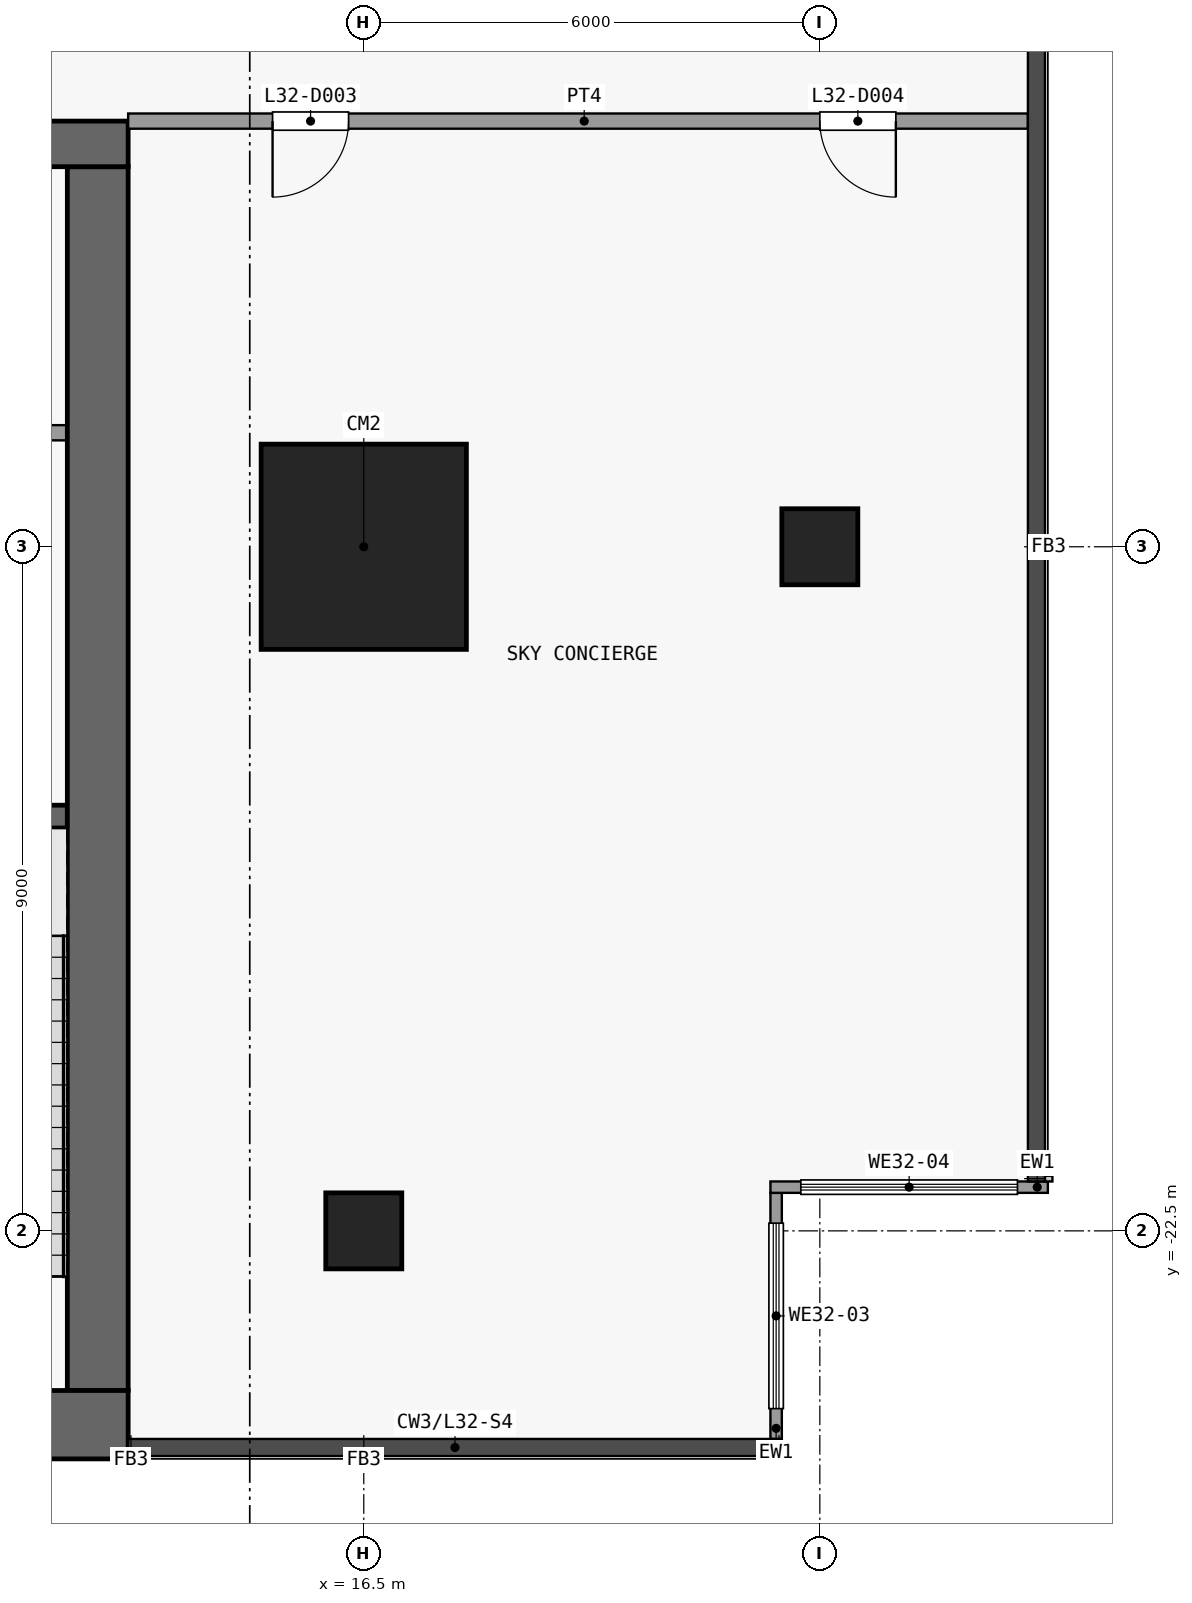
"""IFC4 building model, lengths in metres.
Left out: names, types, materials, properties, quantities, classifications, styles, units other than length and angle.
Written with IfcOpenShell. Run it as: python <this file> out.ifc"""

import sys

from ifc_helpers import new_model, si_unit, direction, frame, frame_2d, origin, origin_2d, place, context, subcontext, project, spatial, rectangle, extrude, element, fill, save


model = new_model("IFC4")
c1 = context("Model", 3, precision=1e-05, world=origin(), true_north=direction((0.0, 1.0)))
c2 = subcontext(c1, "Body", "Model", "MODEL_VIEW")
j1 = project(units=[si_unit("LENGTHUNIT", "METRE"), si_unit("PLANEANGLEUNIT", "RADIAN")], contexts=[c1])
p1 = place(None, origin())
s1 = spatial("IfcSite", under=j1, at=p1, CompositionType="ELEMENT")
p2 = place(p1, origin())
s2 = spatial("IfcBuilding", under=s1, at=p2, CompositionType="ELEMENT")
p3 = place(p2, frame((0.0, 0.0, 127.9)))
s3 = spatial("IfcBuildingStorey", under=s2, at=p3, CompositionType="ELEMENT", Elevation=127.9)
p4 = place(p3, frame((16.5, -22.5, 0.0), z_axis=(0.0, 0.0, 1.0), x_axis=(1.0, 0.0, 0.0)))
e1 = element("IfcColumn", 1, at=p4, inside=s3, PredefinedType="COLUMN", context=c2, shape_type="SweptSolid", body=[
    extrude(rectangle(XDim=1.0, YDim=1.0, at=origin_2d()), origin(), (0.0, 0.0, 1.0), 6.0),
])
p5 = place(p3, frame((16.5, -13.5, 0.0), z_axis=(0.0, 0.0, 1.0), x_axis=(1.0, 0.0, 0.0)))
e2 = element("IfcColumn", 2, at=p5, inside=s3, PredefinedType="COLUMN", context=c2, shape_type="SweptSolid", body=[
    extrude(rectangle(XDim=2.7, YDim=2.7, at=origin_2d()), origin(), (0.0, 0.0, 1.0), 6.0),
])
p6 = place(p3, frame((22.5, -13.5, 0.0), z_axis=(0.0, 0.0, 1.0), x_axis=(1.0, 0.0, 0.0)))
e3 = element("IfcColumn", 3, at=p6, inside=s3, PredefinedType="COLUMN", context=c2, shape_type="SweptSolid", body=[
    extrude(rectangle(XDim=1.0, YDim=1.0, at=origin_2d()), origin(), (0.0, 0.0, 1.0), 6.0),
])
p7 = place(p3, frame((-13.4, -25.05, 0.0), z_axis=(0.0, 0.0, 1.0), x_axis=(1.0, 0.0, 0.0)))
e4 = element("IfcWall", 4, at=p7, inside=s3, PredefinedType="SHEAR", context=c2, shape_type="SweptSolid", body=[
    extrude(rectangle(XDim=26.8, YDim=0.9, at=frame_2d((13.4, 0.0))), origin(), (0.0, 0.0, 1.0), 5.7),
])
p8 = place(p3, frame((-13.4, -8.2, 0.0), z_axis=(0.0, 0.0, 1.0), x_axis=(1.0, 0.0, 0.0)))
e5 = element("IfcWall", 5, at=p8, inside=s3, PredefinedType="SHEAR", context=c2, shape_type="SweptSolid", body=[
    extrude(rectangle(XDim=26.8, YDim=0.6, at=frame_2d((13.4, 0.0))), origin(), (0.0, 0.0, 1.0), 5.7),
])
p9 = place(p8, frame((7.7, 0.0, 0.0)))
e6 = element("IfcOpeningElement", 6, at=p9, cuts=e5, PredefinedType="OPENING", context=c2, shape_type="SweptSolid", body=[
    extrude(rectangle(XDim=1.8, YDim=2.1, at=frame_2d((0.9, 1.05))), frame((0.0, 0.31, 0.0), z_axis=(0.0, -1.0, 0.0), x_axis=(1.0, 0.0, 0.0)), (0.0, 0.0, 1.0), 0.62),
])
p10 = place(p8, frame((17.3, 0.0, 0.0)))
e7 = element("IfcOpeningElement", 7, at=p10, cuts=e5, PredefinedType="OPENING", context=c2, shape_type="SweptSolid", body=[
    extrude(rectangle(XDim=1.8, YDim=2.1, at=frame_2d((0.9, 1.05))), frame((0.0, 0.31, 0.0), z_axis=(0.0, -1.0, 0.0), x_axis=(1.0, 0.0, 0.0)), (0.0, 0.0, 1.0), 0.62),
])
p11 = place(p8, frame((2.625, 0.0, 0.0)))
e8 = element("IfcOpeningElement", 8, at=p11, cuts=e5, PredefinedType="OPENING", context=c2, shape_type="SweptSolid", body=[
    extrude(rectangle(XDim=0.9, YDim=2.1, at=frame_2d((0.45, 1.05))), frame((0.0, 0.31, 0.0), z_axis=(0.0, -1.0, 0.0), x_axis=(1.0, 0.0, 0.0)), (0.0, 0.0, 1.0), 0.62),
])
p12 = place(p8, frame((23.275, 0.0, 0.0)))
e9 = element("IfcOpeningElement", 9, at=p12, cuts=e5, PredefinedType="OPENING", context=c2, shape_type="SweptSolid", body=[
    extrude(rectangle(XDim=0.9, YDim=2.1, at=frame_2d((0.45, 1.05))), frame((0.0, 0.31, 0.0), z_axis=(0.0, -1.0, 0.0), x_axis=(1.0, 0.0, 0.0)), (0.0, 0.0, 1.0), 0.62),
])
p13 = place(p3, frame((13.0, -24.6, 0.0), z_axis=(0.0, 0.0, 1.0), x_axis=(0.0, 1.0, 0.0)))
e10 = element("IfcWall", 10, at=p13, inside=s3, PredefinedType="SHEAR", context=c2, shape_type="SweptSolid", body=[
    extrude(rectangle(XDim=16.1, YDim=0.8, at=frame_2d((8.05, 0.0))), origin(), (0.0, 0.0, 1.0), 5.7),
])
p14 = place(p3, frame((9.5, -17.05, 0.0), z_axis=(0.0, 0.0, 1.0), x_axis=(1.0, 0.0, 0.0)))
e11 = element("IfcWall", 11, at=p14, inside=s3, PredefinedType="SHEAR", context=c2, shape_type="SweptSolid", body=[
    extrude(rectangle(XDim=3.1, YDim=0.3, at=frame_2d((1.55, 0.0))), origin(), (0.0, 0.0, 1.0), 5.7),
])
p15 = place(p3, frame((11.15, -12.0, 0.0), z_axis=(0.0, 0.0, 1.0), x_axis=(1.0, 0.0, 0.0)))
e12 = element("IfcWall", 12, at=p15, inside=s3, PredefinedType="PARTITIONING", context=c2, shape_type="SweptSolid", body=[
    extrude(rectangle(XDim=1.45, YDim=0.2, at=frame_2d((0.725, 0.0))), origin(), (0.0, 0.0, 1.0), 5.7),
])
p16 = place(p3, frame((21.925, -22.0, 0.0), z_axis=(0.0, 0.0, 1.0), x_axis=(0.0, -1.0, 0.0)))
e13 = element("IfcWall", 13, at=p16, inside=s3, PredefinedType="SOLIDWALL", context=c2, shape_type="SweptSolid", body=[
    extrude(rectangle(XDim=3.238, YDim=0.15, at=frame_2d((1.619, 0.0))), origin(), (0.0, 0.0, 1.0), 5.7),
])
p17 = place(p16, frame((0.399, 0.0, 0.9)))
e14 = element("IfcOpeningElement", 14, at=p17, cuts=e13, PredefinedType="OPENING", context=c2, shape_type="SweptSolid", body=[
    extrude(rectangle(XDim=2.44, YDim=2.4, at=frame_2d((1.22, 1.2))), frame((0.0, 0.085, 0.0), z_axis=(0.0, -1.0, 0.0), x_axis=(1.0, 0.0, 0.0)), (0.0, 0.0, 1.0), 0.17),
])
p18 = place(p3, frame((25.5, -21.925, 0.0), z_axis=(0.0, 0.0, 1.0), x_axis=(-1.0, 0.0, 0.0)))
e15 = element("IfcWall", 15, at=p18, inside=s3, PredefinedType="SOLIDWALL", context=c2, shape_type="SweptSolid", body=[
    extrude(rectangle(XDim=3.65, YDim=0.15, at=frame_2d((1.825, 0.0))), origin(), (0.0, 0.0, 1.0), 5.7),
])
p19 = place(p18, frame((0.4, 0.0, 0.9)))
e16 = element("IfcOpeningElement", 16, at=p19, cuts=e15, PredefinedType="OPENING", context=c2, shape_type="SweptSolid", body=[
    extrude(rectangle(XDim=2.85, YDim=2.4, at=frame_2d((1.425, 1.2))), frame((0.0, 0.085, 0.0), z_axis=(0.0, -1.0, 0.0), x_axis=(1.0, 0.0, 0.0)), (0.0, 0.0, 1.0), 0.17),
])
p20 = place(p3, frame((13.4, -7.9, 0.0), z_axis=(0.0, 0.0, 1.0), x_axis=(1.0, 0.0, 0.0)))
e17 = element("IfcWall", 17, at=p20, inside=s3, PredefinedType="PARTITIONING", context=c2, shape_type="SweptSolid", body=[
    extrude(rectangle(XDim=11.838, YDim=0.2, at=frame_2d((5.919, 0.0))), origin(), (0.0, 0.0, 1.0), 5.7),
])
p21 = place(p20, frame((1.9, 0.0, 0.0)))
e18 = element("IfcOpeningElement", 18, at=p21, cuts=e17, PredefinedType="OPENING", context=c2, shape_type="SweptSolid", body=[
    extrude(rectangle(XDim=1.0, YDim=2.1, at=frame_2d((0.5, 1.05))), frame((0.0, 0.11, 0.0), z_axis=(0.0, -1.0, 0.0), x_axis=(1.0, 0.0, 0.0)), (0.0, 0.0, 1.0), 0.22),
])
p22 = place(p20, frame((9.1, 0.0, 0.0)))
e19 = element("IfcOpeningElement", 19, at=p22, cuts=e17, PredefinedType="OPENING", context=c2, shape_type="SweptSolid", body=[
    extrude(rectangle(XDim=1.0, YDim=2.1, at=frame_2d((0.5, 1.05))), frame((0.0, 0.11, 0.0), z_axis=(0.0, -1.0, 0.0), x_axis=(1.0, 0.0, 0.0)), (0.0, 0.0, 1.0), 0.22),
])
p23 = place(p17, origin())
e20 = element("IfcWindow", 20, at=p23, inside=s3, PartitioningType="SINGLE_PANEL", PredefinedType="WINDOW", context=c2, shape_type="SweptSolid", body=[
    extrude(rectangle(XDim=2.44, YDim=2.4, at=frame_2d((1.22, 1.2))), frame((0.0, 0.03, 0.0), z_axis=(0.0, -1.0, 0.0), x_axis=(1.0, 0.0, 0.0)), (0.0, 0.0, 1.0), 0.06),
])
fill(e14, e20)
p24 = place(p19, origin())
e21 = element("IfcWindow", 21, at=p24, inside=s3, PartitioningType="SINGLE_PANEL", PredefinedType="WINDOW", context=c2, shape_type="SweptSolid", body=[
    extrude(rectangle(XDim=2.85, YDim=2.4, at=frame_2d((1.425, 1.2))), frame((0.0, 0.03, 0.0), z_axis=(0.0, -1.0, 0.0), x_axis=(1.0, 0.0, 0.0)), (0.0, 0.0, 1.0), 0.06),
])
fill(e16, e21)
p25 = place(p21, origin())
e22 = element("IfcDoor", 22, at=p25, inside=s3, OperationType="SINGLE_SWING_LEFT", PredefinedType="DOOR", context=c2, shape_type="SweptSolid", body=[
    extrude(rectangle(XDim=1.0, YDim=2.1, at=frame_2d((0.5, 1.05))), frame((0.0, 0.025, 0.0), z_axis=(0.0, -1.0, 0.0), x_axis=(1.0, 0.0, 0.0)), (0.0, 0.0, 1.0), 0.05),
])
fill(e18, e22)
p26 = place(p22, origin())
e23 = element("IfcDoor", 23, at=p26, inside=s3, OperationType="SINGLE_SWING_RIGHT", PredefinedType="DOOR", context=c2, shape_type="SweptSolid", body=[
    extrude(rectangle(XDim=1.0, YDim=2.1, at=frame_2d((0.5, 1.05))), frame((0.0, 0.025, 0.0), z_axis=(0.0, -1.0, 0.0), x_axis=(1.0, 0.0, 0.0)), (0.0, 0.0, 1.0), 0.05),
])
fill(e19, e23)
save(model, sys.argv[1])
